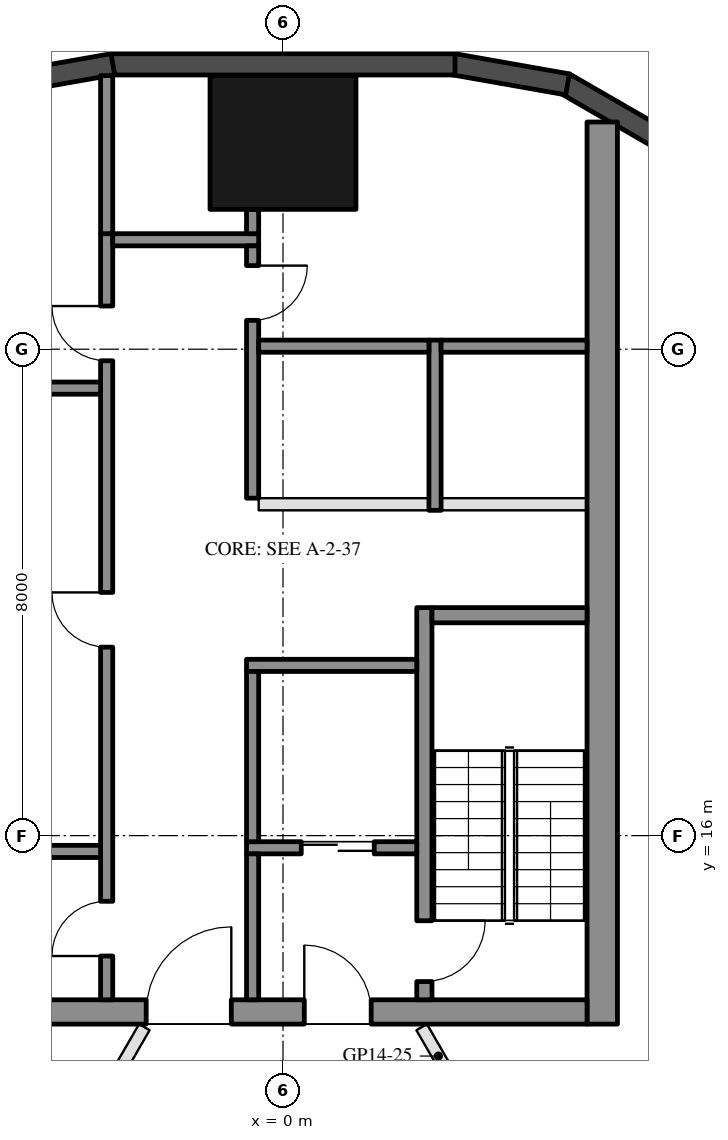
"""IFC4 building model, lengths in metres.
Left out: names, types, materials, properties, quantities, classifications, styles, units other than length and angle.
Written with IfcOpenShell. Run it as: python <this file> out.ifc"""

import sys

from ifc_helpers import new_model, si_unit, direction, frame, frame_2d, origin, origin_2d, place, context, subcontext, project, spatial, rectangle, hollow_rectangle, extrude, element, fill, save


model = new_model("IFC4")
c1 = context("Model", 3, precision=1e-05, world=origin(), true_north=direction((0.0, 1.0)))
c2 = subcontext(c1, "Body", "Model", "MODEL_VIEW")
j1 = project(units=[si_unit("LENGTHUNIT", "METRE"), si_unit("PLANEANGLEUNIT", "RADIAN")], contexts=[c1])
p1 = place(None, origin())
s1 = spatial("IfcSite", under=j1, at=p1, CompositionType="ELEMENT")
p2 = place(p1, origin())
s2 = spatial("IfcBuilding", under=s1, at=p2, CompositionType="ELEMENT")
p3 = place(p2, frame((0.0, 0.0, 161.4)))
s3 = spatial("IfcBuildingStorey", under=s2, at=p3, CompositionType="ELEMENT", Elevation=161.4)
p4 = place(p3, frame((0.0, 27.4, 0.0), z_axis=(0.0, 0.0, 1.0), x_axis=(1.0, 0.0, 0.0)))
e1 = element("IfcColumn", 1, at=p4, inside=s3, PredefinedType="COLUMN", context=c2, shape_type="SweptSolid", body=[
    extrude(hollow_rectangle(XDim=2.4, YDim=2.2, WallThickness=0.06, at=origin_2d()), origin(), (0.0, 0.0, 1.0), 3.7),
])
for number, where, z_axis, x_axis in (
    (2, (6.277, 27.422, 0.0), (0.0, 0.0, 1.0), (-0.866, 0.5, 0.0)),
    (3, (4.68, 28.356, 0.0), (0.0, 0.0, 1.0), (-0.985, 0.174, 0.0)),
):
    element("IfcWall", number, at=place(p3, frame(where, z_axis=z_axis, x_axis=x_axis)), inside=s3, PredefinedType="SOLIDWALL", context=c2, shape_type="SweptSolid", body=[
        extrude(rectangle(XDim=1.91, YDim=0.35, at=frame_2d((0.955, 0.0))), origin(), (0.0, 0.0, 1.0), 3.55),
    ])
p5 = place(p3, frame((2.829, 28.685, 0.0), z_axis=(0.0, 0.0, 1.0), x_axis=(-1.0, 0.0, 0.0)))
e4 = element("IfcWall", 4, at=p5, inside=s3, PredefinedType="SOLIDWALL", context=c2, shape_type="SweptSolid", body=[
    extrude(rectangle(XDim=5.658, YDim=0.35, at=frame_2d((2.829, 0.0))), origin(), (0.0, 0.0, 1.0), 3.55),
])
p6 = place(p3, frame((-2.799, 28.688, 0.0), z_axis=(0.0, 0.0, 1.0), x_axis=(-0.984798995425, -0.173697837091, 0.0)))
e5 = element("IfcWall", 5, at=p6, inside=s3, PredefinedType="SOLIDWALL", context=c2, shape_type="SweptSolid", body=[
    extrude(rectangle(XDim=1.91, YDim=0.35, at=frame_2d((0.955, 0.0))), origin(), (0.0, 0.0, 1.0), 3.55),
])
p7 = place(p3, frame((5.25, 12.9, 0.0), z_axis=(0.0, 0.0, 1.0), x_axis=(0.0, 1.0, 0.0)))
e6 = element("IfcWall", 6, at=p7, inside=s3, PredefinedType="SHEAR", context=c2, shape_type="SweptSolid", body=[
    extrude(rectangle(XDim=14.837, YDim=0.5, at=frame_2d((7.418, 0.0))), origin(), (0.0, 0.0, 1.0), 3.5),
])
p8 = place(p3, frame((5.0, 13.1, 0.0), z_axis=(0.0, 0.0, 1.0), x_axis=(-1.0, 0.0, 0.0)))
e7 = element("IfcWall", 7, at=p8, inside=s3, PredefinedType="SHEAR", context=c2, shape_type="SweptSolid", body=[
    extrude(rectangle(XDim=10.0, YDim=0.4, at=frame_2d((5.0, 0.0))), origin(), (0.0, 0.0, 1.0), 3.5),
])
p9 = place(p8, frame((3.55, 0.0, 0.0)))
e8 = element("IfcOpeningElement", 8, at=p9, cuts=e7, PredefinedType="OPENING", context=c2, shape_type="SweptSolid", body=[
    extrude(rectangle(XDim=1.1, YDim=2.1, at=frame_2d((0.55, 1.05))), frame((0.0, 0.21, 0.0), z_axis=(0.0, -1.0, 0.0), x_axis=(1.0, 0.0, 0.0)), (0.0, 0.0, 1.0), 0.42),
])
p10 = place(p8, frame((5.85, 0.0, 0.0)))
e9 = element("IfcOpeningElement", 9, at=p10, cuts=e7, PredefinedType="OPENING", context=c2, shape_type="SweptSolid", body=[
    extrude(rectangle(XDim=1.4, YDim=2.1, at=frame_2d((0.7, 1.05))), frame((0.0, 0.21, 0.0), z_axis=(0.0, -1.0, 0.0), x_axis=(1.0, 0.0, 0.0)), (0.0, 0.0, 1.0), 0.42),
])
p11 = place(p3, frame((2.325, 13.3, 0.0), z_axis=(0.0, 0.0, 1.0), x_axis=(0.0, 1.0, 0.0)))
e10 = element("IfcWall", 10, at=p11, inside=s3, PredefinedType="SHEAR", context=c2, shape_type="SweptSolid", body=[
    extrude(rectangle(XDim=6.45, YDim=0.25, at=frame_2d((3.225, 0.0))), origin(), (0.0, 0.0, 1.0), 3.5),
])
p12 = place(p11, frame((0.3, 0.0, 0.0)))
e11 = element("IfcOpeningElement", 11, at=p12, cuts=e10, PredefinedType="OPENING", context=c2, shape_type="SweptSolid", body=[
    extrude(rectangle(XDim=1.0, YDim=2.1, at=frame_2d((0.5, 1.05))), frame((0.0, 0.135, 0.0), z_axis=(0.0, -1.0, 0.0), x_axis=(1.0, 0.0, 0.0)), (0.0, 0.0, 1.0), 0.27),
])
p13 = place(p3, frame((5.0, 19.625, 0.0), z_axis=(0.0, 0.0, 1.0), x_axis=(-1.0, 0.0, 0.0)))
e12 = element("IfcWall", 12, at=p13, inside=s3, PredefinedType="SHEAR", context=c2, shape_type="SweptSolid", body=[
    extrude(rectangle(XDim=2.55, YDim=0.25, at=frame_2d((1.275, 0.0))), origin(), (0.0, 0.0, 1.0), 3.5),
])
p14 = place(p3, frame((2.2, 18.8, 0.0), z_axis=(0.0, 0.0, 1.0), x_axis=(-1.0, 0.0, 0.0)))
e13 = element("IfcWall", 13, at=p14, inside=s3, PredefinedType="SHEAR", context=c2, shape_type="SweptSolid", body=[
    extrude(rectangle(XDim=2.8, YDim=0.2, at=frame_2d((1.4, 0.0))), origin(), (0.0, 0.0, 1.0), 3.5),
])
p15 = place(p3, frame((2.2, 15.8, 0.0), z_axis=(0.0, 0.0, 1.0), x_axis=(-1.0, 0.0, 0.0)))
e14 = element("IfcWall", 14, at=p15, inside=s3, PredefinedType="SHEAR", context=c2, shape_type="SweptSolid", body=[
    extrude(rectangle(XDim=2.8, YDim=0.2, at=frame_2d((1.4, 0.0))), origin(), (0.0, 0.0, 1.0), 3.5),
])
p16 = place(p15, frame((0.7, 0.0, 0.0)))
e15 = element("IfcOpeningElement", 15, at=p16, cuts=e14, PredefinedType="OPENING", context=c2, shape_type="SweptSolid", body=[
    extrude(rectangle(XDim=1.2, YDim=2.1, at=frame_2d((0.6, 1.05))), frame((0.0, 0.11, 0.0), z_axis=(0.0, -1.0, 0.0), x_axis=(1.0, 0.0, 0.0)), (0.0, 0.0, 1.0), 0.22),
])
p17 = place(p3, frame((-0.5, 15.9, 0.0), z_axis=(0.0, 0.0, 1.0), x_axis=(0.0, 1.0, 0.0)))
e16 = element("IfcWall", 16, at=p17, inside=s3, PredefinedType="SHEAR", context=c2, shape_type="SweptSolid", body=[
    extrude(rectangle(XDim=2.8, YDim=0.2, at=frame_2d((1.4, 0.0))), origin(), (0.0, 0.0, 1.0), 3.5),
])
p18 = place(p3, frame((-0.5, 13.3, 0.0), z_axis=(0.0, 0.0, 1.0), x_axis=(0.0, 1.0, 0.0)))
e17 = element("IfcWall", 17, at=p18, inside=s3, PredefinedType="SHEAR", context=c2, shape_type="SweptSolid", body=[
    extrude(rectangle(XDim=2.4, YDim=0.2, at=frame_2d((1.2, 0.0))), origin(), (0.0, 0.0, 1.0), 3.5),
])
p19 = place(p3, frame((-2.9, 13.3, 0.0), z_axis=(0.0, 0.0, 1.0), x_axis=(0.0, 1.0, 0.0)))
e18 = element("IfcWall", 18, at=p19, inside=s3, PredefinedType="SHEAR", context=c2, shape_type="SweptSolid", body=[
    extrude(rectangle(XDim=12.6, YDim=0.2, at=frame_2d((6.3, 0.0))), origin(), (0.0, 0.0, 1.0), 3.5),
])
p20 = place(p19, frame((0.72, 0.0, 0.0)))
e19 = element("IfcOpeningElement", 19, at=p20, cuts=e18, PredefinedType="OPENING", context=c2, shape_type="SweptSolid", body=[
    extrude(rectangle(XDim=0.9, YDim=2.1, at=frame_2d((0.45, 1.05))), frame((0.0, 0.11, 0.0), z_axis=(0.0, -1.0, 0.0), x_axis=(1.0, 0.0, 0.0)), (0.0, 0.0, 1.0), 0.22),
])
p21 = place(p19, frame((5.8, 0.0, 0.0)))
e20 = element("IfcOpeningElement", 20, at=p21, cuts=e18, PredefinedType="OPENING", context=c2, shape_type="SweptSolid", body=[
    extrude(rectangle(XDim=0.9, YDim=2.1, at=frame_2d((0.45, 1.05))), frame((0.0, 0.11, 0.0), z_axis=(0.0, -1.0, 0.0), x_axis=(1.0, 0.0, 0.0)), (0.0, 0.0, 1.0), 0.22),
])
p22 = place(p19, frame((10.51, 0.0, 0.0)))
e21 = element("IfcOpeningElement", 21, at=p22, cuts=e18, PredefinedType="OPENING", context=c2, shape_type="SweptSolid", body=[
    extrude(rectangle(XDim=0.9, YDim=2.1, at=frame_2d((0.45, 1.05))), frame((0.0, 0.11, 0.0), z_axis=(0.0, -1.0, 0.0), x_axis=(1.0, 0.0, 0.0)), (0.0, 0.0, 1.0), 0.22),
])
p23 = place(p3, frame((-0.4, 25.8, 0.0), z_axis=(0.0, 0.0, 1.0), x_axis=(-1.0, 0.0, 0.0)))
e22 = element("IfcWall", 22, at=p23, inside=s3, PredefinedType="SHEAR", context=c2, shape_type="SweptSolid", body=[
    extrude(rectangle(XDim=2.4, YDim=0.2, at=frame_2d((1.2, 0.0))), origin(), (0.0, 0.0, 1.0), 3.5),
])
p24 = place(p3, frame((-0.5, 21.55, 0.0), z_axis=(0.0, 0.0, 1.0), x_axis=(0.0, 1.0, 0.0)))
e23 = element("IfcWall", 23, at=p24, inside=s3, PredefinedType="SHEAR", context=c2, shape_type="SweptSolid", body=[
    extrude(rectangle(XDim=4.15, YDim=0.2, at=frame_2d((2.075, 0.0))), origin(), (0.0, 0.0, 1.0), 3.5),
])
p25 = place(p24, frame((2.925, 0.0, 0.0)))
e24 = element("IfcOpeningElement", 24, at=p25, cuts=e23, PredefinedType="OPENING", context=c2, shape_type="SweptSolid", body=[
    extrude(rectangle(XDim=0.9, YDim=2.1, at=frame_2d((0.45, 1.05))), frame((0.0, 0.11, 0.0), z_axis=(0.0, -1.0, 0.0), x_axis=(1.0, 0.0, 0.0)), (0.0, 0.0, 1.0), 0.22),
])
for number, where, z_axis, x_axis in (
    (25, (-3.0, 15.74, 0.0), (0.0, 0.0, 1.0), (-1.0, 0.0, 0.0)),
    (26, (-3.0, 23.36, 0.0), (0.0, 0.0, 1.0), (-1.0, 0.0, 0.0)),
):
    element("IfcWall", number, at=place(p3, frame(where, z_axis=z_axis, x_axis=x_axis)), inside=s3, PredefinedType="SHEAR", context=c2, shape_type="SweptSolid", body=[
        extrude(rectangle(XDim=2.0, YDim=0.2, at=frame_2d((1.0, 0.0))), origin(), (0.0, 0.0, 1.0), 3.5),
    ])
p26 = place(p3, frame((-0.5, 25.9, 0.0), z_axis=(0.0, 0.0, 1.0), x_axis=(0.0, 1.0, 0.0)))
e27 = element("IfcWall", 27, at=p26, inside=s3, PredefinedType="SHEAR", context=c2, shape_type="SweptSolid", body=[
    extrude(rectangle(XDim=0.4, YDim=0.2, at=frame_2d((0.2, 0.0))), origin(), (0.0, 0.0, 1.0), 3.5),
])
p27 = place(p3, frame((-2.9, 25.9, 0.0), z_axis=(0.0, 0.0, 1.0), x_axis=(0.0, 1.0, 0.0)))
e28 = element("IfcWall", 28, at=p27, inside=s3, PredefinedType="SHEAR", context=c2, shape_type="SweptSolid", body=[
    extrude(rectangle(XDim=2.6, YDim=0.2, at=frame_2d((1.3, 0.0))), origin(), (0.0, 0.0, 1.0), 3.5),
])
p28 = place(p3, frame((2.5, 21.35, 0.0), z_axis=(0.0, 0.0, 1.0), x_axis=(0.0, 1.0, 0.0)))
e29 = element("IfcWall", 29, at=p28, inside=s3, PredefinedType="SHEAR", context=c2, shape_type="SweptSolid", body=[
    extrude(rectangle(XDim=2.8, YDim=0.2, at=frame_2d((1.4, 0.0))), origin(), (0.0, 0.0, 1.0), 3.5),
])
p29 = place(p3, frame((5.0, 24.05, 0.0), z_axis=(0.0, 0.0, 1.0), x_axis=(-1.0, 0.0, 0.0)))
e30 = element("IfcWall", 30, at=p29, inside=s3, PredefinedType="SHEAR", context=c2, shape_type="SweptSolid", body=[
    extrude(rectangle(XDim=2.4, YDim=0.2, at=frame_2d((1.2, 0.0))), origin(), (0.0, 0.0, 1.0), 3.5),
])
p30 = place(p3, frame((2.4, 24.05, 0.0), z_axis=(0.0, 0.0, 1.0), x_axis=(-1.0, 0.0, 0.0)))
e31 = element("IfcWall", 31, at=p30, inside=s3, PredefinedType="SHEAR", context=c2, shape_type="SweptSolid", body=[
    extrude(rectangle(XDim=2.8, YDim=0.2, at=frame_2d((1.4, 0.0))), origin(), (0.0, 0.0, 1.0), 3.5),
])
p31 = place(p3, frame((5.0, 21.45, 0.0), z_axis=(0.0, 0.0, 1.0), x_axis=(-1.0, 0.0, 0.0)))
e32 = element("IfcWall", 32, at=p31, inside=s3, PredefinedType="PARTITIONING", context=c2, shape_type="SweptSolid", body=[
    extrude(rectangle(XDim=2.4, YDim=0.2, at=frame_2d((1.2, 0.0))), origin(), (0.0, 0.0, 1.0), 3.5),
])
p32 = place(p3, frame((2.4, 21.45, 0.0), z_axis=(0.0, 0.0, 1.0), x_axis=(-1.0, 0.0, 0.0)))
e33 = element("IfcWall", 33, at=p32, inside=s3, PredefinedType="PARTITIONING", context=c2, shape_type="SweptSolid", body=[
    extrude(rectangle(XDim=2.8, YDim=0.2, at=frame_2d((1.4, 0.0))), origin(), (0.0, 0.0, 1.0), 3.5),
])
p33 = place(p3, frame((14.722, 13.061, 0.0), z_axis=(0.0, 0.0, 1.0), x_axis=(-0.921447968583, -0.388501790465, 0.0)))
e34 = element("IfcWall", 34, at=p33, inside=s3, PredefinedType="PARTITIONING", context=c2, shape_type="SweptSolid", body=[
    extrude(rectangle(XDim=11.066, YDim=0.2, at=frame_2d((5.533, 0.0))), origin(), (0.0, 0.0, 1.0), 2.95),
])
p34 = place(p3, frame((2.281, 12.85, 0.0), z_axis=(0.0, 0.0, 1.0), x_axis=(0.500030411023, -0.86600784526, 0.0)))
e35 = element("IfcWall", 35, at=p34, inside=s3, PredefinedType="PARTITIONING", context=c2, shape_type="SweptSolid", body=[
    extrude(rectangle(XDim=4.575, YDim=0.2, at=frame_2d((2.288, 0.0))), origin(), (0.0, 0.0, 1.0), 2.95),
])
p35 = place(p34, frame((1.787, 0.0, 0.0)))
e36 = element("IfcOpeningElement", 36, at=p35, cuts=e35, PredefinedType="OPENING", context=c2, shape_type="SweptSolid", body=[
    extrude(rectangle(XDim=1.0, YDim=2.1, at=frame_2d((0.5, 1.05))), frame((0.0, 0.11, 0.0), z_axis=(0.0, -1.0, 0.0), x_axis=(1.0, 0.0, 0.0)), (0.0, 0.0, 1.0), 0.22),
])
p36 = place(p3, frame((-4.618, 8.801, 0.0), z_axis=(0.0, 0.0, 1.0), x_axis=(0.499980071345, 0.866036909293, 0.0)))
e37 = element("IfcWall", 37, at=p36, inside=s3, PredefinedType="PARTITIONING", context=c2, shape_type="SweptSolid", body=[
    extrude(rectangle(XDim=4.676, YDim=0.2, at=frame_2d((2.338, 0.0))), origin(), (0.0, 0.0, 1.0), 2.95),
])
p37 = place(p36, frame((1.838, 0.0, 0.0)))
e38 = element("IfcOpeningElement", 38, at=p37, cuts=e37, PredefinedType="OPENING", context=c2, shape_type="SweptSolid", body=[
    extrude(rectangle(XDim=1.0, YDim=2.1, at=frame_2d((0.5, 1.05))), frame((0.0, 0.11, 0.0), z_axis=(0.0, -1.0, 0.0), x_axis=(1.0, 0.0, 0.0)), (0.0, 0.0, 1.0), 0.22),
])
p38 = place(p16, origin())
e39 = element("IfcDoor", 39, at=p38, inside=s3, OperationType="DOUBLE_DOOR_SLIDING", PredefinedType="DOOR", context=c2, shape_type="SweptSolid", body=[
    extrude(rectangle(XDim=1.2, YDim=2.1, at=frame_2d((0.6, 1.05))), frame((0.0, 0.025, 0.0), z_axis=(0.0, -1.0, 0.0), x_axis=(1.0, 0.0, 0.0)), (0.0, 0.0, 1.0), 0.05),
])
fill(e15, e39)
p39 = place(p20, origin())
e40 = element("IfcDoor", 40, at=p39, inside=s3, OperationType="SINGLE_SWING_LEFT", PredefinedType="DOOR", context=c2, shape_type="SweptSolid", body=[
    extrude(rectangle(XDim=0.9, YDim=2.1, at=frame_2d((0.45, 1.05))), frame((0.0, 0.025, 0.0), z_axis=(0.0, -1.0, 0.0), x_axis=(1.0, 0.0, 0.0)), (0.0, 0.0, 1.0), 0.05),
])
fill(e19, e40)
p40 = place(p21, origin())
e41 = element("IfcDoor", 41, at=p40, inside=s3, OperationType="SINGLE_SWING_RIGHT", PredefinedType="DOOR", context=c2, shape_type="SweptSolid", body=[
    extrude(rectangle(XDim=0.9, YDim=2.1, at=frame_2d((0.45, 1.05))), frame((0.0, 0.025, 0.0), z_axis=(0.0, -1.0, 0.0), x_axis=(1.0, 0.0, 0.0)), (0.0, 0.0, 1.0), 0.05),
])
fill(e20, e41)
p41 = place(p22, origin())
e42 = element("IfcDoor", 42, at=p41, inside=s3, OperationType="SINGLE_SWING_RIGHT", PredefinedType="DOOR", context=c2, shape_type="SweptSolid", body=[
    extrude(rectangle(XDim=0.9, YDim=2.1, at=frame_2d((0.45, 1.05))), frame((0.0, 0.025, 0.0), z_axis=(0.0, -1.0, 0.0), x_axis=(1.0, 0.0, 0.0)), (0.0, 0.0, 1.0), 0.05),
])
fill(e21, e42)
p42 = place(p25, frame((0.9, 0.0, 0.0), z_axis=(0.0, 0.0, 1.0), x_axis=(-1.0, 0.0, 0.0)))
e43 = element("IfcDoor", 43, at=p42, inside=s3, OperationType="SINGLE_SWING_LEFT", PredefinedType="DOOR", context=c2, shape_type="SweptSolid", body=[
    extrude(rectangle(XDim=0.9, YDim=2.1, at=frame_2d((0.45, 1.05))), frame((0.0, 0.025, 0.0), z_axis=(0.0, -1.0, 0.0), x_axis=(1.0, 0.0, 0.0)), (0.0, 0.0, 1.0), 0.05),
])
fill(e24, e43)
p43 = place(p9, frame((1.1, 0.0, 0.0), z_axis=(0.0, 0.0, 1.0), x_axis=(-1.0, 0.0, 0.0)))
e44 = element("IfcDoor", 44, at=p43, inside=s3, OperationType="SINGLE_SWING_LEFT", PredefinedType="DOOR", context=c2, shape_type="SweptSolid", body=[
    extrude(rectangle(XDim=1.1, YDim=2.1, at=frame_2d((0.55, 1.05))), frame((0.0, 0.025, 0.0), z_axis=(0.0, -1.0, 0.0), x_axis=(1.0, 0.0, 0.0)), (0.0, 0.0, 1.0), 0.05),
])
fill(e8, e44)
p44 = place(p10, frame((1.4, 0.0, 0.0), z_axis=(0.0, 0.0, 1.0), x_axis=(-1.0, 0.0, 0.0)))
e45 = element("IfcDoor", 45, at=p44, inside=s3, OperationType="DOUBLE_DOOR_SINGLE_SWING", PredefinedType="DOOR", context=c2, shape_type="SweptSolid", body=[
    extrude(rectangle(XDim=1.4, YDim=2.1, at=frame_2d((0.7, 1.05))), frame((0.0, 0.025, 0.0), z_axis=(0.0, -1.0, 0.0), x_axis=(1.0, 0.0, 0.0)), (0.0, 0.0, 1.0), 0.05),
])
fill(e9, e45)
p45 = place(p12, frame((1.0, 0.0, 0.0), z_axis=(0.0, 0.0, 1.0), x_axis=(-1.0, 0.0, 0.0)))
e46 = element("IfcDoor", 46, at=p45, inside=s3, OperationType="SINGLE_SWING_LEFT", PredefinedType="DOOR", context=c2, shape_type="SweptSolid", body=[
    extrude(rectangle(XDim=1.0, YDim=2.1, at=frame_2d((0.5, 1.05))), frame((0.0, 0.025, 0.0), z_axis=(0.0, -1.0, 0.0), x_axis=(1.0, 0.0, 0.0)), (0.0, 0.0, 1.0), 0.05),
])
fill(e11, e46)
save(model, sys.argv[1])
